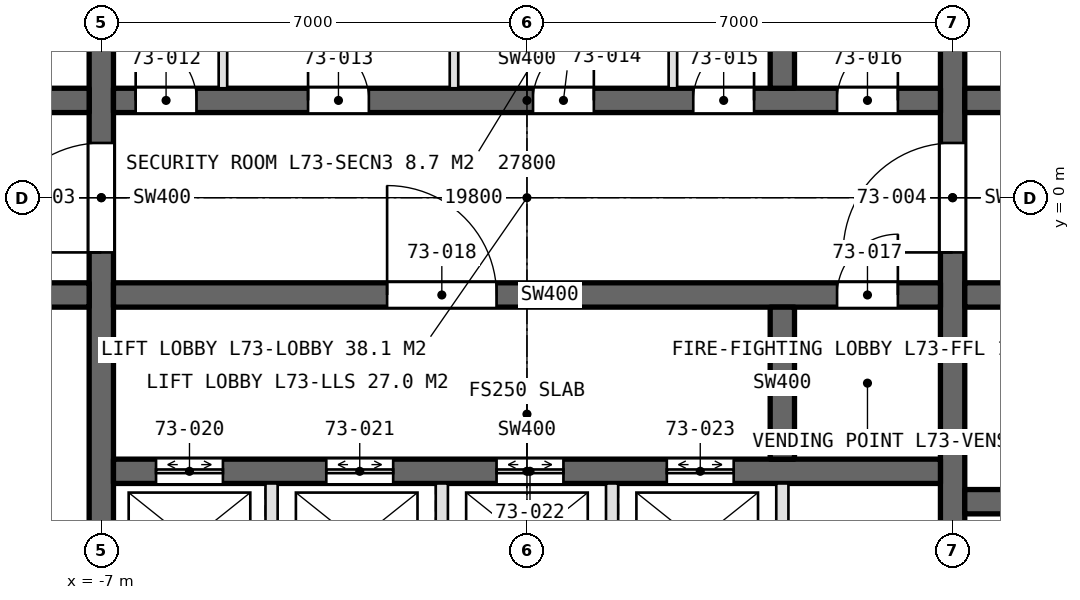
"""IFC4 building model, lengths in metres.
Left out: names, types, materials, properties, quantities, classifications, styles, units other than length and angle.
Written with IfcOpenShell. Run it as: python <this file> out.ifc"""

import sys

from ifc_helpers import new_model, si_unit, direction, frame, frame_2d, origin, place, context, subcontext, project, spatial, rectangle, extrude, element, fill, save


model = new_model("IFC4")
c1 = context("Model", 3, precision=1e-05, world=origin(), true_north=direction((0.0, 1.0)))
c2 = subcontext(c1, "Body", "Model", "MODEL_VIEW")
j1 = project(units=[si_unit("LENGTHUNIT", "METRE"), si_unit("PLANEANGLEUNIT", "RADIAN")], contexts=[c1])
p1 = place(None, origin())
s1 = spatial("IfcSite", under=j1, at=p1, CompositionType="ELEMENT")
p2 = place(p1, origin())
s2 = spatial("IfcBuilding", under=s1, at=p2, CompositionType="ELEMENT")
p3 = place(p2, frame((0.0, 0.0, 325.8)))
s3 = spatial("IfcBuildingStorey", under=s2, at=p3, CompositionType="ELEMENT", Elevation=325.8)
p4 = place(p3, frame((-7.0, -8.9, 0.0), z_axis=(0.0, 0.0, 1.0), x_axis=(0.0, 1.0, 0.0)))
e1 = element("IfcWall", 1, at=p4, inside=s3, PredefinedType="SHEAR", context=c2, shape_type="SweptSolid", body=[
    extrude(rectangle(XDim=17.8, YDim=0.4, at=frame_2d((8.9, 0.0))), origin(), (0.0, 0.0, 1.0), 4.2),
])
p5 = place(p4, frame((8.0, 0.0, 0.0)))
e2 = element("IfcOpeningElement", 2, at=p5, cuts=e1, PredefinedType="OPENING", context=c2, shape_type="SweptSolid", body=[
    extrude(rectangle(XDim=1.8, YDim=2.4, at=frame_2d((0.9, 1.2))), frame((0.0, 0.21, 0.0), z_axis=(0.0, -1.0, 0.0), x_axis=(1.0, 0.0, 0.0)), (0.0, 0.0, 1.0), 0.42),
])
p6 = place(p3, frame((7.0, -8.9, 0.0), z_axis=(0.0, 0.0, 1.0), x_axis=(0.0, 1.0, 0.0)))
e3 = element("IfcWall", 3, at=p6, inside=s3, PredefinedType="SHEAR", context=c2, shape_type="SweptSolid", body=[
    extrude(rectangle(XDim=17.8, YDim=0.4, at=frame_2d((8.9, 0.0))), origin(), (0.0, 0.0, 1.0), 4.2),
])
p7 = place(p6, frame((8.0, 0.0, 0.0)))
e4 = element("IfcOpeningElement", 4, at=p7, cuts=e3, PredefinedType="OPENING", context=c2, shape_type="SweptSolid", body=[
    extrude(rectangle(XDim=1.8, YDim=2.4, at=frame_2d((0.9, 1.2))), frame((0.0, 0.21, 0.0), z_axis=(0.0, -1.0, 0.0), x_axis=(1.0, 0.0, 0.0)), (0.0, 0.0, 1.0), 0.42),
])
p8 = place(p3, frame((-6.8, 1.6, 0.0), z_axis=(0.0, 0.0, 1.0), x_axis=(1.0, 0.0, 0.0)))
e5 = element("IfcWall", 5, at=p8, inside=s3, PredefinedType="SHEAR", context=c2, shape_type="SweptSolid", body=[
    extrude(rectangle(XDim=13.6, YDim=0.4, at=frame_2d((6.8, 0.0))), origin(), (0.0, 0.0, 1.0), 4.2),
])
p9 = place(p8, frame((0.365, 0.0, 0.0)))
e6 = element("IfcOpeningElement", 6, at=p9, cuts=e5, PredefinedType="OPENING", context=c2, shape_type="SweptSolid", body=[
    extrude(rectangle(XDim=1.0, YDim=2.4, at=frame_2d((0.5, 1.2))), frame((0.0, 0.21, 0.0), z_axis=(0.0, -1.0, 0.0), x_axis=(1.0, 0.0, 0.0)), (0.0, 0.0, 1.0), 0.42),
])
p10 = place(p8, frame((3.2, 0.0, 0.0)))
e7 = element("IfcOpeningElement", 7, at=p10, cuts=e5, PredefinedType="OPENING", context=c2, shape_type="SweptSolid", body=[
    extrude(rectangle(XDim=1.0, YDim=2.4, at=frame_2d((0.5, 1.2))), frame((0.0, 0.21, 0.0), z_axis=(0.0, -1.0, 0.0), x_axis=(1.0, 0.0, 0.0)), (0.0, 0.0, 1.0), 0.42),
])
p11 = place(p8, frame((6.9, 0.0, 0.0)))
e8 = element("IfcOpeningElement", 8, at=p11, cuts=e5, PredefinedType="OPENING", context=c2, shape_type="SweptSolid", body=[
    extrude(rectangle(XDim=1.0, YDim=2.4, at=frame_2d((0.5, 1.2))), frame((0.0, 0.21, 0.0), z_axis=(0.0, -1.0, 0.0), x_axis=(1.0, 0.0, 0.0)), (0.0, 0.0, 1.0), 0.42),
])
p12 = place(p8, frame((9.535, 0.0, 0.0)))
e9 = element("IfcOpeningElement", 9, at=p12, cuts=e5, PredefinedType="OPENING", context=c2, shape_type="SweptSolid", body=[
    extrude(rectangle(XDim=1.0, YDim=2.4, at=frame_2d((0.5, 1.2))), frame((0.0, 0.21, 0.0), z_axis=(0.0, -1.0, 0.0), x_axis=(1.0, 0.0, 0.0)), (0.0, 0.0, 1.0), 0.42),
])
p13 = place(p8, frame((11.9, 0.0, 0.0)))
e10 = element("IfcOpeningElement", 10, at=p13, cuts=e5, PredefinedType="OPENING", context=c2, shape_type="SweptSolid", body=[
    extrude(rectangle(XDim=1.0, YDim=2.4, at=frame_2d((0.5, 1.2))), frame((0.0, 0.21, 0.0), z_axis=(0.0, -1.0, 0.0), x_axis=(1.0, 0.0, 0.0)), (0.0, 0.0, 1.0), 0.42),
])
p14 = place(p3, frame((-6.8, -1.6, 0.0), z_axis=(0.0, 0.0, 1.0), x_axis=(1.0, 0.0, 0.0)))
e11 = element("IfcWall", 11, at=p14, inside=s3, PredefinedType="SHEAR", context=c2, shape_type="SweptSolid", body=[
    extrude(rectangle(XDim=13.6, YDim=0.4, at=frame_2d((6.8, 0.0))), origin(), (0.0, 0.0, 1.0), 4.2),
])
p15 = place(p14, frame((11.9, 0.0, 0.0)))
e12 = element("IfcOpeningElement", 12, at=p15, cuts=e11, PredefinedType="OPENING", context=c2, shape_type="SweptSolid", body=[
    extrude(rectangle(XDim=1.0, YDim=2.4, at=frame_2d((0.5, 1.2))), frame((0.0, 0.21, 0.0), z_axis=(0.0, -1.0, 0.0), x_axis=(1.0, 0.0, 0.0)), (0.0, 0.0, 1.0), 0.42),
])
p16 = place(p14, frame((4.5, 0.0, 0.0)))
e13 = element("IfcOpeningElement", 13, at=p16, cuts=e11, PredefinedType="OPENING", context=c2, shape_type="SweptSolid", body=[
    extrude(rectangle(XDim=1.8, YDim=2.4, at=frame_2d((0.9, 1.2))), frame((0.0, 0.21, 0.0), z_axis=(0.0, -1.0, 0.0), x_axis=(1.0, 0.0, 0.0)), (0.0, 0.0, 1.0), 0.42),
])
p17 = place(p3, frame((-6.8, -4.5, 0.0), z_axis=(0.0, 0.0, 1.0), x_axis=(1.0, 0.0, 0.0)))
e14 = element("IfcWall", 14, at=p17, inside=s3, PredefinedType="SHEAR", context=c2, shape_type="SweptSolid", body=[
    extrude(rectangle(XDim=13.6, YDim=0.4, at=frame_2d((6.8, 0.0))), origin(), (0.0, 0.0, 1.0), 4.2),
])
p18 = place(p17, frame((0.7, 0.0, 0.0)))
e15 = element("IfcOpeningElement", 15, at=p18, cuts=e14, PredefinedType="OPENING", context=c2, shape_type="SweptSolid", body=[
    extrude(rectangle(XDim=1.1, YDim=2.4, at=frame_2d((0.55, 1.2))), frame((0.0, 0.21, 0.0), z_axis=(0.0, -1.0, 0.0), x_axis=(1.0, 0.0, 0.0)), (0.0, 0.0, 1.0), 0.42),
])
p19 = place(p17, frame((3.5, 0.0, 0.0)))
e16 = element("IfcOpeningElement", 16, at=p19, cuts=e14, PredefinedType="OPENING", context=c2, shape_type="SweptSolid", body=[
    extrude(rectangle(XDim=1.1, YDim=2.4, at=frame_2d((0.55, 1.2))), frame((0.0, 0.21, 0.0), z_axis=(0.0, -1.0, 0.0), x_axis=(1.0, 0.0, 0.0)), (0.0, 0.0, 1.0), 0.42),
])
p20 = place(p17, frame((6.3, 0.0, 0.0)))
e17 = element("IfcOpeningElement", 17, at=p20, cuts=e14, PredefinedType="OPENING", context=c2, shape_type="SweptSolid", body=[
    extrude(rectangle(XDim=1.1, YDim=2.4, at=frame_2d((0.55, 1.2))), frame((0.0, 0.21, 0.0), z_axis=(0.0, -1.0, 0.0), x_axis=(1.0, 0.0, 0.0)), (0.0, 0.0, 1.0), 0.42),
])
p21 = place(p17, frame((9.1, 0.0, 0.0)))
e18 = element("IfcOpeningElement", 18, at=p21, cuts=e14, PredefinedType="OPENING", context=c2, shape_type="SweptSolid", body=[
    extrude(rectangle(XDim=1.1, YDim=2.4, at=frame_2d((0.55, 1.2))), frame((0.0, 0.21, 0.0), z_axis=(0.0, -1.0, 0.0), x_axis=(1.0, 0.0, 0.0)), (0.0, 0.0, 1.0), 0.42),
])
for number, where, z_axis, x_axis in (
    (19, (-12.9, 1.6, 0.0), (0.0, 0.0, 1.0), (1.0, 0.0, 0.0)),
    (20, (-12.9, -1.6, 0.0), (0.0, 0.0, 1.0), (1.0, 0.0, 0.0)),
):
    element("IfcWall", number, at=place(p3, frame(where, z_axis=z_axis, x_axis=x_axis)), inside=s3, PredefinedType="SHEAR", context=c2, shape_type="SweptSolid", body=[
        extrude(rectangle(XDim=5.7, YDim=0.4, at=frame_2d((2.85, 0.0))), origin(), (0.0, 0.0, 1.0), 4.2),
    ])
p22 = place(p3, frame((7.2, 1.6, 0.0), z_axis=(0.0, 0.0, 1.0), x_axis=(1.0, 0.0, 0.0)))
e21 = element("IfcWall", 21, at=p22, inside=s3, PredefinedType="SHEAR", context=c2, shape_type="SweptSolid", body=[
    extrude(rectangle(XDim=5.7, YDim=0.4, at=frame_2d((2.85, 0.0))), origin(), (0.0, 0.0, 1.0), 4.2),
])
p23 = place(p22, frame((0.7, 0.0, 0.0)))
e22 = element("IfcOpeningElement", 22, at=p23, cuts=e21, PredefinedType="OPENING", context=c2, shape_type="SweptSolid", body=[
    extrude(rectangle(XDim=1.0, YDim=2.4, at=frame_2d((0.5, 1.2))), frame((0.0, 0.21, 0.0), z_axis=(0.0, -1.0, 0.0), x_axis=(1.0, 0.0, 0.0)), (0.0, 0.0, 1.0), 0.42),
])
p24 = place(p3, frame((7.2, -1.6, 0.0), z_axis=(0.0, 0.0, 1.0), x_axis=(1.0, 0.0, 0.0)))
e23 = element("IfcWall", 23, at=p24, inside=s3, PredefinedType="SHEAR", context=c2, shape_type="SweptSolid", body=[
    extrude(rectangle(XDim=5.7, YDim=0.4, at=frame_2d((2.85, 0.0))), origin(), (0.0, 0.0, 1.0), 4.2),
])
p25 = place(p24, frame((0.9, 0.0, 0.0)))
e24 = element("IfcOpeningElement", 24, at=p25, cuts=e23, PredefinedType="OPENING", context=c2, shape_type="SweptSolid", body=[
    extrude(rectangle(XDim=1.3, YDim=2.4, at=frame_2d((0.65, 1.2))), frame((0.0, 0.21, 0.0), z_axis=(0.0, -1.0, 0.0), x_axis=(1.0, 0.0, 0.0)), (0.0, 0.0, 1.0), 0.42),
])
p26 = place(p24, frame((3.95, 0.0, 0.0)))
e25 = element("IfcOpeningElement", 25, at=p26, cuts=e23, PredefinedType="OPENING", context=c2, shape_type="SweptSolid", body=[
    extrude(rectangle(XDim=1.3, YDim=2.4, at=frame_2d((0.65, 1.2))), frame((0.0, 0.21, 0.0), z_axis=(0.0, -1.0, 0.0), x_axis=(1.0, 0.0, 0.0)), (0.0, 0.0, 1.0), 0.42),
])
p27 = place(p3, frame((7.2, -5.0, 0.0), z_axis=(0.0, 0.0, 1.0), x_axis=(1.0, 0.0, 0.0)))
e26 = element("IfcWall", 26, at=p27, inside=s3, PredefinedType="SHEAR", context=c2, shape_type="SweptSolid", body=[
    extrude(rectangle(XDim=5.7, YDim=0.4, at=frame_2d((2.85, 0.0))), origin(), (0.0, 0.0, 1.0), 4.2),
])
for number, where, z_axis, x_axis in (
    (27, (4.2, 1.8, 0.0), (0.0, 0.0, 1.0), (0.0, 1.0, 0.0)),
    (28, (4.2, -4.3, 0.0), (0.0, 0.0, 1.0), (0.0, 1.0, 0.0)),
):
    element("IfcWall", number, at=place(p3, frame(where, z_axis=z_axis, x_axis=x_axis)), inside=s3, PredefinedType="SHEAR", context=c2, shape_type="SweptSolid", body=[
        extrude(rectangle(XDim=2.5, YDim=0.4, at=frame_2d((1.25, 0.0))), origin(), (0.0, 0.0, 1.0), 4.2),
    ])
for number, where, z_axis, x_axis in (
    (29, (-5.0, 1.8, 0.0), (0.0, 0.0, 1.0), (0.0, 1.0, 0.0)),
    (30, (-1.2, 1.8, 0.0), (0.0, 0.0, 1.0), (0.0, 1.0, 0.0)),
    (31, (2.4, 1.8, 0.0), (0.0, 0.0, 1.0), (0.0, 1.0, 0.0)),
):
    element("IfcWall", number, at=place(p3, frame(where, z_axis=z_axis, x_axis=x_axis)), inside=s3, PredefinedType="PARTITIONING", context=c2, shape_type="SweptSolid", body=[
        extrude(rectangle(XDim=2.5, YDim=0.14, at=frame_2d((1.25, 0.0))), origin(), (0.0, 0.0, 1.0), 3.95),
    ])
for number, where, z_axis, x_axis in (
    (32, (-4.2, -4.7, 0.0), (0.0, 0.0, 1.0), (0.0, -1.0, 0.0)),
    (33, (-1.4, -4.7, 0.0), (0.0, 0.0, 1.0), (0.0, -1.0, 0.0)),
    (34, (1.4, -4.7, 0.0), (0.0, 0.0, 1.0), (0.0, -1.0, 0.0)),
    (35, (4.2, -4.7, 0.0), (0.0, 0.0, 1.0), (0.0, -1.0, 0.0)),
):
    element("IfcWall", number, at=place(p3, frame(where, z_axis=z_axis, x_axis=x_axis)), inside=s3, PredefinedType="PARTITIONING", context=c2, shape_type="SweptSolid", body=[
        extrude(rectangle(XDim=4.2, YDim=0.2, at=frame_2d((2.1, 0.0))), origin(), (0.0, 0.0, 1.0), 4.2),
    ])
p28 = place(p5, origin())
e36 = element("IfcDoor", 36, at=p28, inside=s3, OperationType="DOUBLE_DOOR_SINGLE_SWING", PredefinedType="DOOR", context=c2, shape_type="SweptSolid", body=[
    extrude(rectangle(XDim=1.8, YDim=2.4, at=frame_2d((0.9, 1.2))), frame((0.0, 0.025, 0.0), z_axis=(0.0, -1.0, 0.0), x_axis=(1.0, 0.0, 0.0)), (0.0, 0.0, 1.0), 0.05),
])
fill(e2, e36)
p29 = place(p7, origin())
e37 = element("IfcDoor", 37, at=p29, inside=s3, OperationType="DOUBLE_DOOR_SINGLE_SWING", PredefinedType="DOOR", context=c2, shape_type="SweptSolid", body=[
    extrude(rectangle(XDim=1.8, YDim=2.4, at=frame_2d((0.9, 1.2))), frame((0.0, 0.025, 0.0), z_axis=(0.0, -1.0, 0.0), x_axis=(1.0, 0.0, 0.0)), (0.0, 0.0, 1.0), 0.05),
])
fill(e4, e37)
p30 = place(p9, origin())
e38 = element("IfcDoor", 38, at=p30, inside=s3, OperationType="SINGLE_SWING_LEFT", PredefinedType="DOOR", context=c2, shape_type="SweptSolid", body=[
    extrude(rectangle(XDim=1.0, YDim=2.4, at=frame_2d((0.5, 1.2))), frame((0.0, 0.025, 0.0), z_axis=(0.0, -1.0, 0.0), x_axis=(1.0, 0.0, 0.0)), (0.0, 0.0, 1.0), 0.05),
])
fill(e6, e38)
p31 = place(p10, origin())
e39 = element("IfcDoor", 39, at=p31, inside=s3, OperationType="SINGLE_SWING_LEFT", PredefinedType="DOOR", context=c2, shape_type="SweptSolid", body=[
    extrude(rectangle(XDim=1.0, YDim=2.4, at=frame_2d((0.5, 1.2))), frame((0.0, 0.025, 0.0), z_axis=(0.0, -1.0, 0.0), x_axis=(1.0, 0.0, 0.0)), (0.0, 0.0, 1.0), 0.05),
])
fill(e7, e39)
p32 = place(p11, origin())
e40 = element("IfcDoor", 40, at=p32, inside=s3, OperationType="SINGLE_SWING_RIGHT", PredefinedType="DOOR", context=c2, shape_type="SweptSolid", body=[
    extrude(rectangle(XDim=1.0, YDim=2.4, at=frame_2d((0.5, 1.2))), frame((0.0, 0.025, 0.0), z_axis=(0.0, -1.0, 0.0), x_axis=(1.0, 0.0, 0.0)), (0.0, 0.0, 1.0), 0.05),
])
fill(e8, e40)
p33 = place(p12, origin())
e41 = element("IfcDoor", 41, at=p33, inside=s3, OperationType="SINGLE_SWING_RIGHT", PredefinedType="DOOR", context=c2, shape_type="SweptSolid", body=[
    extrude(rectangle(XDim=1.0, YDim=2.4, at=frame_2d((0.5, 1.2))), frame((0.0, 0.025, 0.0), z_axis=(0.0, -1.0, 0.0), x_axis=(1.0, 0.0, 0.0)), (0.0, 0.0, 1.0), 0.05),
])
fill(e9, e41)
p34 = place(p13, origin())
e42 = element("IfcDoor", 42, at=p34, inside=s3, OperationType="SINGLE_SWING_RIGHT", PredefinedType="DOOR", context=c2, shape_type="SweptSolid", body=[
    extrude(rectangle(XDim=1.0, YDim=2.4, at=frame_2d((0.5, 1.2))), frame((0.0, 0.025, 0.0), z_axis=(0.0, -1.0, 0.0), x_axis=(1.0, 0.0, 0.0)), (0.0, 0.0, 1.0), 0.05),
])
fill(e10, e42)
p35 = place(p15, origin())
e43 = element("IfcDoor", 43, at=p35, inside=s3, OperationType="SINGLE_SWING_RIGHT", PredefinedType="DOOR", context=c2, shape_type="SweptSolid", body=[
    extrude(rectangle(XDim=1.0, YDim=2.4, at=frame_2d((0.5, 1.2))), frame((0.0, 0.025, 0.0), z_axis=(0.0, -1.0, 0.0), x_axis=(1.0, 0.0, 0.0)), (0.0, 0.0, 1.0), 0.05),
])
fill(e12, e43)
p36 = place(p16, origin())
e44 = element("IfcDoor", 44, at=p36, inside=s3, OperationType="DOUBLE_DOOR_SINGLE_SWING", PredefinedType="DOOR", context=c2, shape_type="SweptSolid", body=[
    extrude(rectangle(XDim=1.8, YDim=2.4, at=frame_2d((0.9, 1.2))), frame((0.0, 0.025, 0.0), z_axis=(0.0, -1.0, 0.0), x_axis=(1.0, 0.0, 0.0)), (0.0, 0.0, 1.0), 0.05),
])
fill(e13, e44)
p37 = place(p18, origin())
e45 = element("IfcDoor", 45, at=p37, inside=s3, OperationType="DOUBLE_DOOR_SLIDING", PredefinedType="DOOR", context=c2, shape_type="SweptSolid", body=[
    extrude(rectangle(XDim=1.1, YDim=2.4, at=frame_2d((0.55, 1.2))), frame((0.0, 0.025, 0.0), z_axis=(0.0, -1.0, 0.0), x_axis=(1.0, 0.0, 0.0)), (0.0, 0.0, 1.0), 0.05),
])
fill(e15, e45)
p38 = place(p19, origin())
e46 = element("IfcDoor", 46, at=p38, inside=s3, OperationType="DOUBLE_DOOR_SLIDING", PredefinedType="DOOR", context=c2, shape_type="SweptSolid", body=[
    extrude(rectangle(XDim=1.1, YDim=2.4, at=frame_2d((0.55, 1.2))), frame((0.0, 0.025, 0.0), z_axis=(0.0, -1.0, 0.0), x_axis=(1.0, 0.0, 0.0)), (0.0, 0.0, 1.0), 0.05),
])
fill(e16, e46)
p39 = place(p20, origin())
e47 = element("IfcDoor", 47, at=p39, inside=s3, OperationType="DOUBLE_DOOR_SLIDING", PredefinedType="DOOR", context=c2, shape_type="SweptSolid", body=[
    extrude(rectangle(XDim=1.1, YDim=2.4, at=frame_2d((0.55, 1.2))), frame((0.0, 0.025, 0.0), z_axis=(0.0, -1.0, 0.0), x_axis=(1.0, 0.0, 0.0)), (0.0, 0.0, 1.0), 0.05),
])
fill(e17, e47)
p40 = place(p21, origin())
e48 = element("IfcDoor", 48, at=p40, inside=s3, OperationType="DOUBLE_DOOR_SLIDING", PredefinedType="DOOR", context=c2, shape_type="SweptSolid", body=[
    extrude(rectangle(XDim=1.1, YDim=2.4, at=frame_2d((0.55, 1.2))), frame((0.0, 0.025, 0.0), z_axis=(0.0, -1.0, 0.0), x_axis=(1.0, 0.0, 0.0)), (0.0, 0.0, 1.0), 0.05),
])
fill(e18, e48)
save(model, sys.argv[1])
